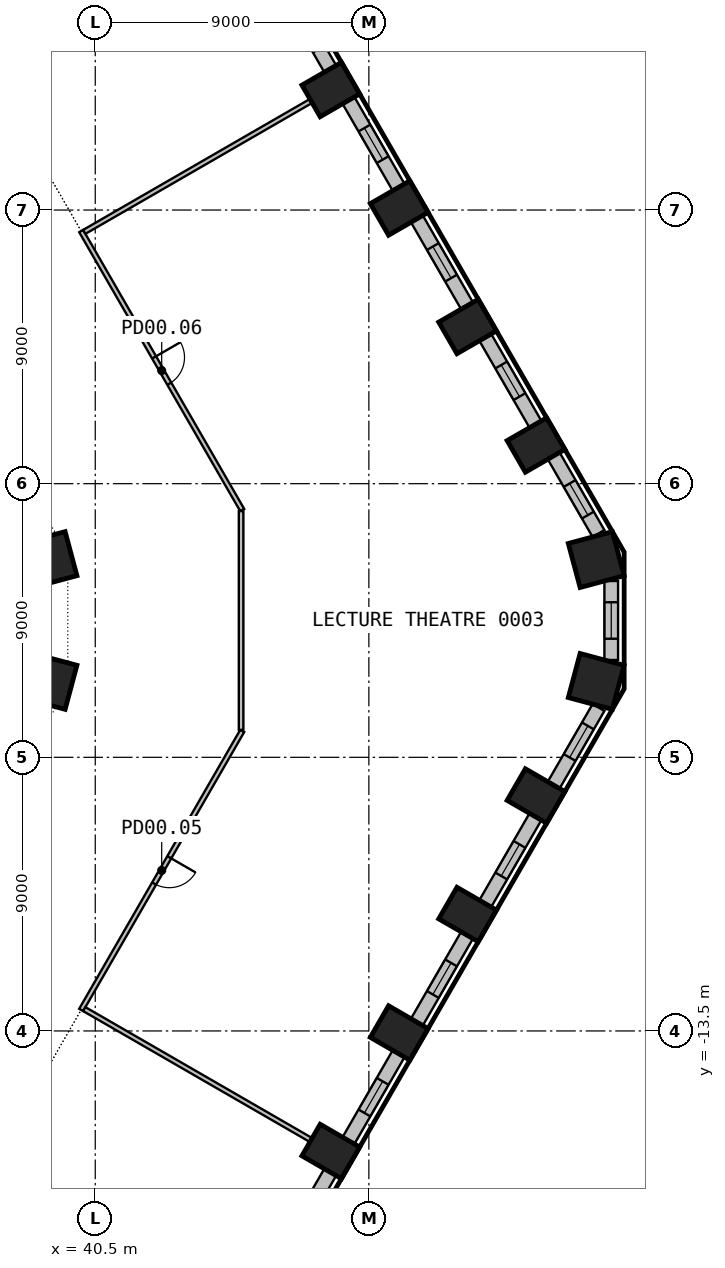
"""IFC4 building model, lengths in metres.
Left out: names, types, materials, properties, quantities, classifications, styles, units other than length and angle.
Written with IfcOpenShell. Run it as: python <this file> out.ifc"""

import sys

from ifc_helpers import new_model, si_unit, direction, frame, frame_2d, origin, origin_2d, place, context, subcontext, project, spatial, rectangle, extrude, element, fill, save


model = new_model("IFC4")
c1 = context("Model", 3, precision=1e-05, world=origin(), true_north=direction((0.0, 1.0)))
c2 = subcontext(c1, "Body", "Model", "MODEL_VIEW")
j1 = project(units=[si_unit("LENGTHUNIT", "METRE"), si_unit("PLANEANGLEUNIT", "RADIAN")], contexts=[c1])
p1 = place(None, origin())
s1 = spatial("IfcSite", under=j1, at=p1, CompositionType="ELEMENT")
p2 = place(p1, origin())
s2 = spatial("IfcBuilding", under=s1, at=p2, CompositionType="ELEMENT")
p3 = place(p2, origin())
s3 = spatial("IfcBuildingStorey", under=s2, at=p3, CompositionType="ELEMENT", Elevation=0.0)
for number, where, z_axis, x_axis in (
    (1, (48.248, -17.463, 0.0), (0.0, 0.0, 1.0), (0.5, 0.866, 0.0)),
    (2, (50.498, -13.566, 0.0), (0.0, 0.0, 1.0), (0.5, 0.866, 0.0)),
    (3, (52.748, -9.669, 0.0), (0.0, 0.0, 1.0), (0.5, 0.866, 0.0)),
    (4, (54.998, -5.772, 0.0), (0.0, 0.0, 1.0), (0.5, 0.866, 0.0)),
):
    element("IfcColumn", number, at=place(p3, frame(where, z_axis=z_axis, x_axis=x_axis)), inside=s3, PredefinedType="COLUMN", context=c2, shape_type="SweptSolid", body=[
        extrude(rectangle(XDim=1.2, YDim=1.5, at=origin_2d()), origin(), (0.0, 0.0, 1.0), 6.0),
    ])
for number, where, z_axis, x_axis in (
    (5, (56.979, -2.004, 0.0), (0.0, 0.0, 1.0), (0.259, 0.966, 0.0)),
    (6, (56.979, 2.004, 0.0), (0.0, 0.0, 1.0), (-0.259, 0.966, 0.0)),
):
    element("IfcColumn", number, at=place(p3, frame(where, z_axis=z_axis, x_axis=x_axis)), inside=s3, PredefinedType="COLUMN", context=c2, shape_type="SweptSolid", body=[
        extrude(rectangle(XDim=1.5, YDim=1.5, at=origin_2d()), origin(), (0.0, 0.0, 1.0), 6.0),
    ])
for number, where, z_axis, x_axis in (
    (7, (54.998, 5.772, 0.0), (0.0, 0.0, 1.0), (-0.5, 0.866, 0.0)),
    (8, (52.748, 9.669, 0.0), (0.0, 0.0, 1.0), (-0.5, 0.866, 0.0)),
    (9, (50.498, 13.566, 0.0), (0.0, 0.0, 1.0), (-0.5, 0.866, 0.0)),
    (10, (48.248, 17.463, 0.0), (0.0, 0.0, 1.0), (-0.5, 0.866, 0.0)),
):
    element("IfcColumn", number, at=place(p3, frame(where, z_axis=z_axis, x_axis=x_axis)), inside=s3, PredefinedType="COLUMN", context=c2, shape_type="SweptSolid", body=[
        extrude(rectangle(XDim=1.2, YDim=1.5, at=origin_2d()), origin(), (0.0, 0.0, 1.0), 6.0),
    ])
for number, where, z_axis, x_axis in (
    (11, (38.979, -2.004, 0.0), (0.0, 0.0, 1.0), (0.259, 0.966, 0.0)),
    (12, (38.979, 2.004, 0.0), (0.0, 0.0, 1.0), (-0.259, 0.966, 0.0)),
):
    element("IfcColumn", number, at=place(p3, frame(where, z_axis=z_axis, x_axis=x_axis)), inside=s3, PredefinedType="COLUMN", context=c2, shape_type="SweptSolid", body=[
        extrude(rectangle(XDim=1.5, YDim=1.5, at=origin_2d()), origin(), (0.0, 0.0, 1.0), 5.6),
    ])
p4 = place(p3, frame((46.579, -21.003, 0.0), z_axis=(0.0, 0.0, 1.0), x_axis=(0.499991515992, 0.866030301974, 0.0)))
e13 = element("IfcWall", 13, at=p4, inside=s3, PredefinedType="SOLIDWALL", context=c2, shape_type="SweptSolid", body=[
    extrude(rectangle(XDim=3.299, YDim=0.45, at=frame_2d((1.649, 0.0))), origin(), (0.0, 0.0, 1.0), 6.0),
])
p5 = place(p4, frame((1.05, 0.0, 0.9)))
e14 = element("IfcOpeningElement", 14, at=p5, cuts=e13, PredefinedType="OPENING", context=c2, shape_type="SweptSolid", body=[
    extrude(rectangle(XDim=1.2, YDim=4.2, at=frame_2d((0.6, 2.1))), frame((0.0, 0.235, 0.0), z_axis=(0.0, -1.0, 0.0), x_axis=(1.0, 0.0, 0.0)), (0.0, 0.0, 1.0), 0.47),
])
p6 = place(p3, frame((48.829, -17.106, 0.0), z_axis=(0.0, 0.0, 1.0), x_axis=(0.49995947208, 0.866048801325, 0.0)))
e15 = element("IfcWall", 15, at=p6, inside=s3, PredefinedType="SOLIDWALL", context=c2, shape_type="SweptSolid", body=[
    extrude(rectangle(XDim=3.299, YDim=0.45, at=frame_2d((1.649, 0.0))), origin(), (0.0, 0.0, 1.0), 6.0),
])
p7 = place(p6, frame((1.05, 0.0, 0.9)))
e16 = element("IfcOpeningElement", 16, at=p7, cuts=e15, PredefinedType="OPENING", context=c2, shape_type="SweptSolid", body=[
    extrude(rectangle(XDim=1.2, YDim=4.2, at=frame_2d((0.6, 2.1))), frame((0.0, 0.235, 0.0), z_axis=(0.0, -1.0, 0.0), x_axis=(1.0, 0.0, 0.0)), (0.0, 0.0, 1.0), 0.47),
])
p8 = place(p3, frame((51.079, -13.209, 0.0), z_axis=(0.0, 0.0, 1.0), x_axis=(0.499991515992, 0.866030301974, 0.0)))
e17 = element("IfcWall", 17, at=p8, inside=s3, PredefinedType="SOLIDWALL", context=c2, shape_type="SweptSolid", body=[
    extrude(rectangle(XDim=3.299, YDim=0.45, at=frame_2d((1.649, 0.0))), origin(), (0.0, 0.0, 1.0), 6.0),
])
p9 = place(p8, frame((1.05, 0.0, 0.9)))
e18 = element("IfcOpeningElement", 18, at=p9, cuts=e17, PredefinedType="OPENING", context=c2, shape_type="SweptSolid", body=[
    extrude(rectangle(XDim=1.2, YDim=4.2, at=frame_2d((0.6, 2.1))), frame((0.0, 0.235, 0.0), z_axis=(0.0, -1.0, 0.0), x_axis=(1.0, 0.0, 0.0)), (0.0, 0.0, 1.0), 0.47),
])
p10 = place(p3, frame((53.329, -9.312, 0.0), z_axis=(0.0, 0.0, 1.0), x_axis=(0.49995947208, 0.866048801325, 0.0)))
e19 = element("IfcWall", 19, at=p10, inside=s3, PredefinedType="SOLIDWALL", context=c2, shape_type="SweptSolid", body=[
    extrude(rectangle(XDim=3.299, YDim=0.45, at=frame_2d((1.649, 0.0))), origin(), (0.0, 0.0, 1.0), 6.0),
])
p11 = place(p10, frame((1.05, 0.0, 0.9)))
e20 = element("IfcOpeningElement", 20, at=p11, cuts=e19, PredefinedType="OPENING", context=c2, shape_type="SweptSolid", body=[
    extrude(rectangle(XDim=1.2, YDim=4.2, at=frame_2d((0.6, 2.1))), frame((0.0, 0.235, 0.0), z_axis=(0.0, -1.0, 0.0), x_axis=(1.0, 0.0, 0.0)), (0.0, 0.0, 1.0), 0.47),
])
p12 = place(p3, frame((55.579, -5.415, 0.0), z_axis=(0.0, 0.0, 1.0), x_axis=(0.500030648271, 0.866007708274, 0.0)))
e21 = element("IfcWall", 21, at=p12, inside=s3, PredefinedType="SOLIDWALL", context=c2, shape_type="SweptSolid", body=[
    extrude(rectangle(XDim=2.948, YDim=0.45, at=frame_2d((1.474, 0.0))), origin(), (0.0, 0.0, 1.0), 6.0),
])
p13 = place(p12, frame((1.05, 0.0, 0.9)))
e22 = element("IfcOpeningElement", 22, at=p13, cuts=e21, PredefinedType="OPENING", context=c2, shape_type="SweptSolid", body=[
    extrude(rectangle(XDim=1.2, YDim=4.2, at=frame_2d((0.6, 2.1))), frame((0.0, 0.235, 0.0), z_axis=(0.0, -1.0, 0.0), x_axis=(1.0, 0.0, 0.0)), (0.0, 0.0, 1.0), 0.47),
])
p14 = place(p3, frame((57.472, -1.299, 0.0), z_axis=(0.0, 0.0, 1.0), x_axis=(0.0, 1.0, 0.0)))
e23 = element("IfcWall", 23, at=p14, inside=s3, PredefinedType="SOLIDWALL", context=c2, shape_type="SweptSolid", body=[
    extrude(rectangle(XDim=2.598, YDim=0.45, at=frame_2d((1.299, 0.0))), origin(), (0.0, 0.0, 1.0), 6.0),
])
p15 = place(p14, frame((0.699, 0.0, 0.9)))
e24 = element("IfcOpeningElement", 24, at=p15, cuts=e23, PredefinedType="OPENING", context=c2, shape_type="SweptSolid", body=[
    extrude(rectangle(XDim=1.2, YDim=4.2, at=frame_2d((0.6, 2.1))), frame((0.0, 0.235, 0.0), z_axis=(0.0, -1.0, 0.0), x_axis=(1.0, 0.0, 0.0)), (0.0, 0.0, 1.0), 0.47),
])
p16 = place(p3, frame((57.054, 2.861, 0.0), z_axis=(0.0, 0.0, 1.0), x_axis=(-0.500030648271, 0.866007708274, 0.0)))
e25 = element("IfcWall", 25, at=p16, inside=s3, PredefinedType="SOLIDWALL", context=c2, shape_type="SweptSolid", body=[
    extrude(rectangle(XDim=2.948, YDim=0.45, at=frame_2d((1.474, 0.0))), origin(), (0.0, 0.0, 1.0), 6.0),
])
p17 = place(p16, frame((0.699, 0.0, 0.9)))
e26 = element("IfcOpeningElement", 26, at=p17, cuts=e25, PredefinedType="OPENING", context=c2, shape_type="SweptSolid", body=[
    extrude(rectangle(XDim=1.2, YDim=4.2, at=frame_2d((0.6, 2.1))), frame((0.0, 0.235, 0.0), z_axis=(0.0, -1.0, 0.0), x_axis=(1.0, 0.0, 0.0)), (0.0, 0.0, 1.0), 0.47),
])
p18 = place(p3, frame((54.979, 6.455, 0.0), z_axis=(0.0, 0.0, 1.0), x_axis=(-0.49995947208, 0.866048801325, 0.0)))
e27 = element("IfcWall", 27, at=p18, inside=s3, PredefinedType="SOLIDWALL", context=c2, shape_type="SweptSolid", body=[
    extrude(rectangle(XDim=3.299, YDim=0.45, at=frame_2d((1.649, 0.0))), origin(), (0.0, 0.0, 1.0), 6.0),
])
p19 = place(p18, frame((1.05, 0.0, 0.9)))
e28 = element("IfcOpeningElement", 28, at=p19, cuts=e27, PredefinedType="OPENING", context=c2, shape_type="SweptSolid", body=[
    extrude(rectangle(XDim=1.2, YDim=4.2, at=frame_2d((0.6, 2.1))), frame((0.0, 0.235, 0.0), z_axis=(0.0, -1.0, 0.0), x_axis=(1.0, 0.0, 0.0)), (0.0, 0.0, 1.0), 0.47),
])
p20 = place(p3, frame((52.729, 10.352, 0.0), z_axis=(0.0, 0.0, 1.0), x_axis=(-0.499991515992, 0.866030301974, 0.0)))
e29 = element("IfcWall", 29, at=p20, inside=s3, PredefinedType="SOLIDWALL", context=c2, shape_type="SweptSolid", body=[
    extrude(rectangle(XDim=3.299, YDim=0.45, at=frame_2d((1.649, 0.0))), origin(), (0.0, 0.0, 1.0), 6.0),
])
p21 = place(p20, frame((1.05, 0.0, 0.9)))
e30 = element("IfcOpeningElement", 30, at=p21, cuts=e29, PredefinedType="OPENING", context=c2, shape_type="SweptSolid", body=[
    extrude(rectangle(XDim=1.2, YDim=4.2, at=frame_2d((0.6, 2.1))), frame((0.0, 0.235, 0.0), z_axis=(0.0, -1.0, 0.0), x_axis=(1.0, 0.0, 0.0)), (0.0, 0.0, 1.0), 0.47),
])
p22 = place(p3, frame((50.479, 14.249, 0.0), z_axis=(0.0, 0.0, 1.0), x_axis=(-0.49995947208, 0.866048801325, 0.0)))
e31 = element("IfcWall", 31, at=p22, inside=s3, PredefinedType="SOLIDWALL", context=c2, shape_type="SweptSolid", body=[
    extrude(rectangle(XDim=3.299, YDim=0.45, at=frame_2d((1.649, 0.0))), origin(), (0.0, 0.0, 1.0), 6.0),
])
p23 = place(p22, frame((1.05, 0.0, 0.9)))
e32 = element("IfcOpeningElement", 32, at=p23, cuts=e31, PredefinedType="OPENING", context=c2, shape_type="SweptSolid", body=[
    extrude(rectangle(XDim=1.2, YDim=4.2, at=frame_2d((0.6, 2.1))), frame((0.0, 0.235, 0.0), z_axis=(0.0, -1.0, 0.0), x_axis=(1.0, 0.0, 0.0)), (0.0, 0.0, 1.0), 0.47),
])
p24 = place(p3, frame((46.579, 21.003, 0.0), z_axis=(0.0, 0.0, 1.0), x_axis=(0.499991515992, -0.866030301974, 0.0)))
e33 = element("IfcWall", 33, at=p24, inside=s3, PredefinedType="SOLIDWALL", context=c2, shape_type="SweptSolid", body=[
    extrude(rectangle(XDim=3.299, YDim=0.45, at=frame_2d((1.649, 0.0))), origin(), (0.0, 0.0, 1.0), 6.0),
])
p25 = place(p24, frame((0.75, 0.0, 0.0)))
e34 = element("IfcOpeningElement", 34, at=p25, cuts=e33, PredefinedType="OPENING", context=c2, shape_type="SweptSolid", body=[
    extrude(rectangle(XDim=1.8, YDim=2.4, at=frame_2d((0.9, 1.2))), frame((0.0, 0.235, 0.0), z_axis=(0.0, -1.0, 0.0), x_axis=(1.0, 0.0, 0.0)), (0.0, 0.0, 1.0), 0.47),
])
p26 = place(p3, frame((45.334, -3.632, 0.0), z_axis=(0.0, 0.0, 1.0), x_axis=(-0.499965106835, -0.866045548425, 0.0)))
e35 = element("IfcWall", 35, at=p26, inside=s3, PredefinedType="PARTITIONING", context=c2, shape_type="SweptSolid", body=[
    extrude(rectangle(XDim=10.596, YDim=0.15, at=frame_2d((5.298, 0.0))), origin(), (0.0, 0.0, 1.0), 6.0),
])
p27 = place(p26, frame((4.798, 0.0, 0.0)))
e36 = element("IfcOpeningElement", 36, at=p27, cuts=e35, PredefinedType="OPENING", context=c2, shape_type="SweptSolid", body=[
    extrude(rectangle(XDim=1.0, YDim=2.1, at=frame_2d((0.5, 1.05))), frame((0.0, 0.085, 0.0), z_axis=(0.0, -1.0, 0.0), x_axis=(1.0, 0.0, 0.0)), (0.0, 0.0, 1.0), 0.17),
])
p28 = place(p3, frame((40.139, -12.781, 0.0), z_axis=(0.0, 0.0, 1.0), x_axis=(0.866022831428, -0.500004455426, 0.0)))
e37 = element("IfcWall", 37, at=p28, inside=s3, PredefinedType="PARTITIONING", context=c2, shape_type="SweptSolid", body=[
    extrude(rectangle(XDim=8.593, YDim=0.15, at=frame_2d((4.297, 0.0))), origin(), (0.0, 0.0, 1.0), 6.0),
])
p29 = place(p3, frame((40.037, 12.809, 0.0), z_axis=(0.0, 0.0, 1.0), x_axis=(0.499965106835, -0.866045548425, 0.0)))
e38 = element("IfcWall", 38, at=p29, inside=s3, PredefinedType="PARTITIONING", context=c2, shape_type="SweptSolid", body=[
    extrude(rectangle(XDim=10.596, YDim=0.15, at=frame_2d((5.298, 0.0))), origin(), (0.0, 0.0, 1.0), 6.0),
])
p30 = place(p29, frame((4.798, 0.0, 0.0)))
e39 = element("IfcOpeningElement", 39, at=p30, cuts=e38, PredefinedType="OPENING", context=c2, shape_type="SweptSolid", body=[
    extrude(rectangle(XDim=1.0, YDim=2.1, at=frame_2d((0.5, 1.05))), frame((0.0, 0.085, 0.0), z_axis=(0.0, -1.0, 0.0), x_axis=(1.0, 0.0, 0.0)), (0.0, 0.0, 1.0), 0.17),
])
p31 = place(p3, frame((47.581, 17.078, 0.0), z_axis=(0.0, 0.0, 1.0), x_axis=(-0.866022831428, -0.500004455426, 0.0)))
e40 = element("IfcWall", 40, at=p31, inside=s3, PredefinedType="PARTITIONING", context=c2, shape_type="SweptSolid", body=[
    extrude(rectangle(XDim=8.593, YDim=0.15, at=frame_2d((4.297, 0.0))), origin(), (0.0, 0.0, 1.0), 6.0),
])
p32 = place(p3, frame((45.297, 3.597, 0.0), z_axis=(0.0, 0.0, 1.0), x_axis=(0.0, -1.0, 0.0)))
e41 = element("IfcWall", 41, at=p32, inside=s3, PredefinedType="PARTITIONING", context=c2, shape_type="SweptSolid", body=[
    extrude(rectangle(XDim=7.194, YDim=0.15, at=frame_2d((3.597, 0.0))), origin(), (0.0, 0.0, 1.0), 6.0),
])
p33 = place(p7, origin())
e42 = element("IfcWindow", 42, at=p33, inside=s3, PartitioningType="SINGLE_PANEL", PredefinedType="WINDOW", context=c2, shape_type="SweptSolid", body=[
    extrude(rectangle(XDim=1.2, YDim=4.2, at=frame_2d((0.6, 2.1))), frame((0.0, 0.03, 0.0), z_axis=(0.0, -1.0, 0.0), x_axis=(1.0, 0.0, 0.0)), (0.0, 0.0, 1.0), 0.06),
])
fill(e16, e42)
p34 = place(p9, origin())
e43 = element("IfcWindow", 43, at=p34, inside=s3, PartitioningType="SINGLE_PANEL", PredefinedType="WINDOW", context=c2, shape_type="SweptSolid", body=[
    extrude(rectangle(XDim=1.2, YDim=4.2, at=frame_2d((0.6, 2.1))), frame((0.0, 0.03, 0.0), z_axis=(0.0, -1.0, 0.0), x_axis=(1.0, 0.0, 0.0)), (0.0, 0.0, 1.0), 0.06),
])
fill(e18, e43)
p35 = place(p11, origin())
e44 = element("IfcWindow", 44, at=p35, inside=s3, PartitioningType="SINGLE_PANEL", PredefinedType="WINDOW", context=c2, shape_type="SweptSolid", body=[
    extrude(rectangle(XDim=1.2, YDim=4.2, at=frame_2d((0.6, 2.1))), frame((0.0, 0.03, 0.0), z_axis=(0.0, -1.0, 0.0), x_axis=(1.0, 0.0, 0.0)), (0.0, 0.0, 1.0), 0.06),
])
fill(e20, e44)
p36 = place(p13, origin())
e45 = element("IfcWindow", 45, at=p36, inside=s3, PartitioningType="SINGLE_PANEL", PredefinedType="WINDOW", context=c2, shape_type="SweptSolid", body=[
    extrude(rectangle(XDim=1.2, YDim=4.2, at=frame_2d((0.6, 2.1))), frame((0.0, 0.03, 0.0), z_axis=(0.0, -1.0, 0.0), x_axis=(1.0, 0.0, 0.0)), (0.0, 0.0, 1.0), 0.06),
])
fill(e22, e45)
p37 = place(p15, origin())
e46 = element("IfcWindow", 46, at=p37, inside=s3, PartitioningType="SINGLE_PANEL", PredefinedType="WINDOW", context=c2, shape_type="SweptSolid", body=[
    extrude(rectangle(XDim=1.2, YDim=4.2, at=frame_2d((0.6, 2.1))), frame((0.0, 0.03, 0.0), z_axis=(0.0, -1.0, 0.0), x_axis=(1.0, 0.0, 0.0)), (0.0, 0.0, 1.0), 0.06),
])
fill(e24, e46)
p38 = place(p17, origin())
e47 = element("IfcWindow", 47, at=p38, inside=s3, PartitioningType="SINGLE_PANEL", PredefinedType="WINDOW", context=c2, shape_type="SweptSolid", body=[
    extrude(rectangle(XDim=1.2, YDim=4.2, at=frame_2d((0.6, 2.1))), frame((0.0, 0.03, 0.0), z_axis=(0.0, -1.0, 0.0), x_axis=(1.0, 0.0, 0.0)), (0.0, 0.0, 1.0), 0.06),
])
fill(e26, e47)
p39 = place(p19, origin())
e48 = element("IfcWindow", 48, at=p39, inside=s3, PartitioningType="SINGLE_PANEL", PredefinedType="WINDOW", context=c2, shape_type="SweptSolid", body=[
    extrude(rectangle(XDim=1.2, YDim=4.2, at=frame_2d((0.6, 2.1))), frame((0.0, 0.03, 0.0), z_axis=(0.0, -1.0, 0.0), x_axis=(1.0, 0.0, 0.0)), (0.0, 0.0, 1.0), 0.06),
])
fill(e28, e48)
p40 = place(p21, origin())
e49 = element("IfcWindow", 49, at=p40, inside=s3, PartitioningType="SINGLE_PANEL", PredefinedType="WINDOW", context=c2, shape_type="SweptSolid", body=[
    extrude(rectangle(XDim=1.2, YDim=4.2, at=frame_2d((0.6, 2.1))), frame((0.0, 0.03, 0.0), z_axis=(0.0, -1.0, 0.0), x_axis=(1.0, 0.0, 0.0)), (0.0, 0.0, 1.0), 0.06),
])
fill(e30, e49)
p41 = place(p23, origin())
e50 = element("IfcWindow", 50, at=p41, inside=s3, PartitioningType="SINGLE_PANEL", PredefinedType="WINDOW", context=c2, shape_type="SweptSolid", body=[
    extrude(rectangle(XDim=1.2, YDim=4.2, at=frame_2d((0.6, 2.1))), frame((0.0, 0.03, 0.0), z_axis=(0.0, -1.0, 0.0), x_axis=(1.0, 0.0, 0.0)), (0.0, 0.0, 1.0), 0.06),
])
fill(e32, e50)
p42 = place(p27, origin())
e51 = element("IfcDoor", 51, at=p42, inside=s3, OperationType="SINGLE_SWING_RIGHT", PredefinedType="DOOR", context=c2, shape_type="SweptSolid", body=[
    extrude(rectangle(XDim=1.0, YDim=2.1, at=frame_2d((0.5, 1.05))), frame((0.0, 0.025, 0.0), z_axis=(0.0, -1.0, 0.0), x_axis=(1.0, 0.0, 0.0)), (0.0, 0.0, 1.0), 0.05),
])
fill(e36, e51)
p43 = place(p30, origin())
e52 = element("IfcDoor", 52, at=p43, inside=s3, OperationType="SINGLE_SWING_LEFT", PredefinedType="DOOR", context=c2, shape_type="SweptSolid", body=[
    extrude(rectangle(XDim=1.0, YDim=2.1, at=frame_2d((0.5, 1.05))), frame((0.0, 0.025, 0.0), z_axis=(0.0, -1.0, 0.0), x_axis=(1.0, 0.0, 0.0)), (0.0, 0.0, 1.0), 0.05),
])
fill(e39, e52)
save(model, sys.argv[1])
